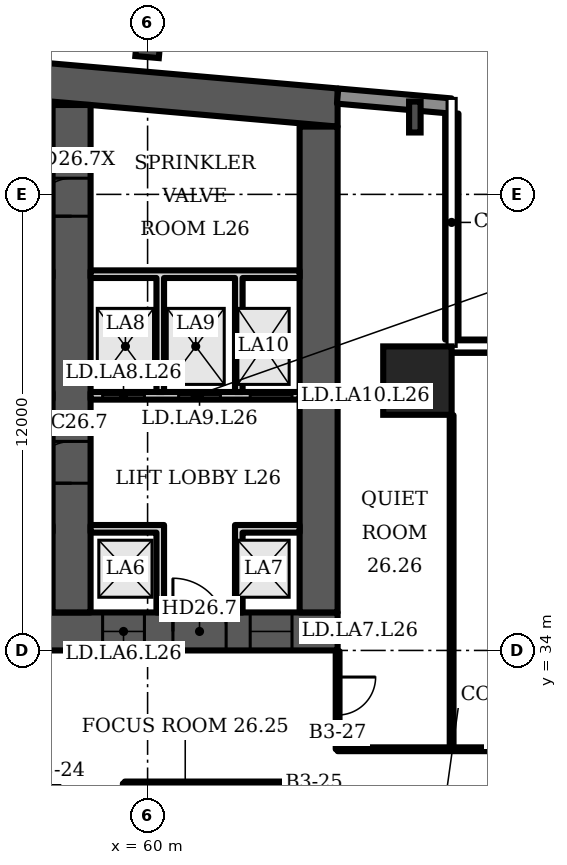
"""IFC4 building model, lengths in metres.
Left out: names, types, materials, properties, quantities, classifications, styles, units other than length and angle.
Written with IfcOpenShell. Run it as: python <this file> out.ifc"""

import sys

from ifc_helpers import new_model, si_unit, direction, frame, frame_2d, origin, origin_2d, place, context, subcontext, project, spatial, polyline, rectangle, i_section, outline, extrude, element, fill, save


model = new_model("IFC4")
c1 = context("Model", 3, precision=1e-05, world=origin(), true_north=direction((0.0, 1.0)))
c2 = subcontext(c1, "Body", "Model", "MODEL_VIEW")
j1 = project(units=[si_unit("LENGTHUNIT", "METRE"), si_unit("PLANEANGLEUNIT", "RADIAN")], contexts=[c1])
p1 = place(None, origin())
s1 = spatial("IfcSite", under=j1, at=p1, CompositionType="ELEMENT")
p2 = place(p1, origin())
s2 = spatial("IfcBuilding", under=s1, at=p2, CompositionType="ELEMENT")
p3 = place(p2, frame((0.0, 0.0, 114.7)))
s3 = spatial("IfcBuildingStorey", under=s2, at=p3, CompositionType="ELEMENT", Elevation=114.7)
p4 = place(p3, origin())
e1 = element("IfcWall", 1, at=p4, inside=s3, PredefinedType="SHEAR", context=c2, shape_type="SweptSolid", body=[
    extrude(outline(polyline([(16.0, 47.784), (40.5, 49.927), (65.0, 47.784), (65.0, 48.787), (40.5, 50.931), (16.0, 48.787), (16.0, 47.784)])), origin(), (0.0, 0.0, 1.0), 3.6),
])
p5 = place(p3, frame((16.0, 34.5, 0.0), z_axis=(0.0, 0.0, 1.0), x_axis=(1.0, 0.0, 0.0)))
e2 = element("IfcWall", 2, at=p5, inside=s3, PredefinedType="SHEAR", context=c2, shape_type="SweptSolid", body=[
    extrude(rectangle(XDim=49.0, YDim=1.0, at=frame_2d((24.5, 0.0))), origin(), (0.0, 0.0, 1.0), 3.6),
])
p6 = place(p5, frame((1.2, 0.0, 0.0)))
e3 = element("IfcOpeningElement", 3, at=p6, cuts=e2, PredefinedType="OPENING", context=c2, shape_type="SweptSolid", body=[
    extrude(rectangle(XDim=1.1, YDim=2.1, at=frame_2d((0.55, 1.05))), frame((0.0, 0.51, 0.0), z_axis=(0.0, -1.0, 0.0), x_axis=(1.0, 0.0, 0.0)), (0.0, 0.0, 1.0), 1.02),
])
p7 = place(p5, frame((5.083, 0.0, 0.0)))
e4 = element("IfcOpeningElement", 4, at=p7, cuts=e2, PredefinedType="OPENING", context=c2, shape_type="SweptSolid", body=[
    extrude(rectangle(XDim=1.1, YDim=2.1, at=frame_2d((0.55, 1.05))), frame((0.0, 0.51, 0.0), z_axis=(0.0, -1.0, 0.0), x_axis=(1.0, 0.0, 0.0)), (0.0, 0.0, 1.0), 1.02),
])
p8 = place(p5, frame((2.933, 0.0, 0.0)))
e5 = element("IfcOpeningElement", 5, at=p8, cuts=e2, PredefinedType="OPENING", context=c2, shape_type="SweptSolid", body=[
    extrude(rectangle(XDim=1.4, YDim=2.1, at=frame_2d((0.7, 1.05))), frame((0.0, 0.51, 0.0), z_axis=(0.0, -1.0, 0.0), x_axis=(1.0, 0.0, 0.0)), (0.0, 0.0, 1.0), 1.02),
])
p9 = place(p5, frame((7.65, 0.0, 0.0)))
e6 = element("IfcOpeningElement", 6, at=p9, cuts=e2, PredefinedType="OPENING", context=c2, shape_type="SweptSolid", body=[
    extrude(rectangle(XDim=1.2, YDim=2.1, at=frame_2d((0.6, 1.05))), frame((0.0, 0.51, 0.0), z_axis=(0.0, -1.0, 0.0), x_axis=(1.0, 0.0, 0.0)), (0.0, 0.0, 1.0), 1.02),
])
p10 = place(p5, frame((14.817, 0.0, 0.0)))
e7 = element("IfcOpeningElement", 7, at=p10, cuts=e2, PredefinedType="OPENING", context=c2, shape_type="SweptSolid", body=[
    extrude(rectangle(XDim=1.1, YDim=2.1, at=frame_2d((0.55, 1.05))), frame((0.0, 0.51, 0.0), z_axis=(0.0, -1.0, 0.0), x_axis=(1.0, 0.0, 0.0)), (0.0, 0.0, 1.0), 1.02),
])
p11 = place(p5, frame((19.083, 0.0, 0.0)))
e8 = element("IfcOpeningElement", 8, at=p11, cuts=e2, PredefinedType="OPENING", context=c2, shape_type="SweptSolid", body=[
    extrude(rectangle(XDim=1.1, YDim=2.1, at=frame_2d((0.55, 1.05))), frame((0.0, 0.51, 0.0), z_axis=(0.0, -1.0, 0.0), x_axis=(1.0, 0.0, 0.0)), (0.0, 0.0, 1.0), 1.02),
])
p12 = place(p5, frame((16.8, 0.0, 0.0)))
e9 = element("IfcOpeningElement", 9, at=p12, cuts=e2, PredefinedType="OPENING", context=c2, shape_type="SweptSolid", body=[
    extrude(rectangle(XDim=1.4, YDim=2.1, at=frame_2d((0.7, 1.05))), frame((0.0, 0.51, 0.0), z_axis=(0.0, -1.0, 0.0), x_axis=(1.0, 0.0, 0.0)), (0.0, 0.0, 1.0), 1.02),
])
p13 = place(p5, frame((21.817, 0.0, 0.0)))
e10 = element("IfcOpeningElement", 10, at=p13, cuts=e2, PredefinedType="OPENING", context=c2, shape_type="SweptSolid", body=[
    extrude(rectangle(XDim=1.1, YDim=2.1, at=frame_2d((0.55, 1.05))), frame((0.0, 0.51, 0.0), z_axis=(0.0, -1.0, 0.0), x_axis=(1.0, 0.0, 0.0)), (0.0, 0.0, 1.0), 1.02),
])
p14 = place(p5, frame((26.083, 0.0, 0.0)))
e11 = element("IfcOpeningElement", 11, at=p14, cuts=e2, PredefinedType="OPENING", context=c2, shape_type="SweptSolid", body=[
    extrude(rectangle(XDim=1.1, YDim=2.1, at=frame_2d((0.55, 1.05))), frame((0.0, 0.51, 0.0), z_axis=(0.0, -1.0, 0.0), x_axis=(1.0, 0.0, 0.0)), (0.0, 0.0, 1.0), 1.02),
])
p15 = place(p5, frame((33.15, 0.0, 0.0)))
e12 = element("IfcOpeningElement", 12, at=p15, cuts=e2, PredefinedType="OPENING", context=c2, shape_type="SweptSolid", body=[
    extrude(rectangle(XDim=1.2, YDim=2.1, at=frame_2d((0.6, 1.05))), frame((0.0, 0.51, 0.0), z_axis=(0.0, -1.0, 0.0), x_axis=(1.0, 0.0, 0.0)), (0.0, 0.0, 1.0), 1.02),
])
p16 = place(p5, frame((37.8, 0.0, 0.0)))
e13 = element("IfcOpeningElement", 13, at=p16, cuts=e2, PredefinedType="OPENING", context=c2, shape_type="SweptSolid", body=[
    extrude(rectangle(XDim=1.4, YDim=2.1, at=frame_2d((0.7, 1.05))), frame((0.0, 0.51, 0.0), z_axis=(0.0, -1.0, 0.0), x_axis=(1.0, 0.0, 0.0)), (0.0, 0.0, 1.0), 1.02),
])
p17 = place(p5, frame((42.817, 0.0, 0.0)))
e14 = element("IfcOpeningElement", 14, at=p17, cuts=e2, PredefinedType="OPENING", context=c2, shape_type="SweptSolid", body=[
    extrude(rectangle(XDim=1.1, YDim=2.1, at=frame_2d((0.55, 1.05))), frame((0.0, 0.51, 0.0), z_axis=(0.0, -1.0, 0.0), x_axis=(1.0, 0.0, 0.0)), (0.0, 0.0, 1.0), 1.02),
])
p18 = place(p5, frame((46.7, 0.0, 0.0)))
e15 = element("IfcOpeningElement", 15, at=p18, cuts=e2, PredefinedType="OPENING", context=c2, shape_type="SweptSolid", body=[
    extrude(rectangle(XDim=1.1, YDim=2.1, at=frame_2d((0.55, 1.05))), frame((0.0, 0.51, 0.0), z_axis=(0.0, -1.0, 0.0), x_axis=(1.0, 0.0, 0.0)), (0.0, 0.0, 1.0), 1.02),
])
p19 = place(p5, frame((44.667, 0.0, 0.0)))
e16 = element("IfcOpeningElement", 16, at=p19, cuts=e2, PredefinedType="OPENING", context=c2, shape_type="SweptSolid", body=[
    extrude(rectangle(XDim=1.4, YDim=2.1, at=frame_2d((0.7, 1.05))), frame((0.0, 0.51, 0.0), z_axis=(0.0, -1.0, 0.0), x_axis=(1.0, 0.0, 0.0)), (0.0, 0.0, 1.0), 1.02),
])
p20 = place(p3, frame((58.0, 35.0, 0.0), z_axis=(0.0, 0.0, 1.0), x_axis=(0.0, 1.0, 0.0)))
e17 = element("IfcWall", 17, at=p20, inside=s3, PredefinedType="SHEAR", context=c2, shape_type="SweptSolid", body=[
    extrude(rectangle(XDim=13.352, YDim=1.0, at=frame_2d((6.676, 0.0))), origin(), (0.0, 0.0, 1.0), 3.6),
])
p21 = place(p20, frame((10.426, 0.0, 0.0)))
e18 = element("IfcOpeningElement", 18, at=p21, cuts=e17, PredefinedType="OPENING", context=c2, shape_type="SweptSolid", body=[
    extrude(rectangle(XDim=1.0, YDim=2.1, at=frame_2d((0.5, 1.05))), frame((0.0, 0.51, 0.0), z_axis=(0.0, -1.0, 0.0), x_axis=(1.0, 0.0, 0.0)), (0.0, 0.0, 1.0), 1.02),
])
p22 = place(p20, frame((3.4, 0.0, 0.0)))
e19 = element("IfcOpeningElement", 19, at=p22, cuts=e17, PredefinedType="OPENING", context=c2, shape_type="SweptSolid", body=[
    extrude(rectangle(XDim=1.1, YDim=2.1, at=frame_2d((0.55, 1.05))), frame((0.0, 0.51, 0.0), z_axis=(0.0, -1.0, 0.0), x_axis=(1.0, 0.0, 0.0)), (0.0, 0.0, 1.0), 1.02),
])
p23 = place(p3, frame((64.5, 35.0, 0.0), z_axis=(0.0, 0.0, 1.0), x_axis=(0.0, 1.0, 0.0)))
e20 = element("IfcWall", 20, at=p23, inside=s3, PredefinedType="SHEAR", context=c2, shape_type="SweptSolid", body=[
    extrude(rectangle(XDim=12.784, YDim=1.0, at=frame_2d((6.392, 0.0))), origin(), (0.0, 0.0, 1.0), 3.6),
])
p24 = place(p3, frame((67.1, 41.1, 0.0), z_axis=(0.0, 0.0, 1.0), x_axis=(1.0, 0.0, 0.0)))
e21 = element("IfcColumn", 21, at=p24, inside=s3, PredefinedType="COLUMN", context=c2, shape_type="SweptSolid", body=[
    extrude(rectangle(XDim=1.8, YDim=1.8, at=origin_2d()), origin(), (0.0, 0.0, 1.0), 3.6),
])
p25 = place(p3, frame((67.032, 48.036, 0.0), z_axis=(0.0, 0.0, 1.0), x_axis=(1.0, 0.0, 0.0)))
e22 = element("IfcColumn", 22, at=p25, inside=s3, PredefinedType="COLUMN", context=c2, shape_type="SweptSolid", body=[
    extrude(i_section(OverallWidth=0.303, OverallDepth=0.814, WebThickness=0.021, FlangeThickness=0.04, FilletRadius=0.03, at=origin_2d()), origin(), (0.0, 0.0, 1.0), 3.6),
])
p26 = place(p3, frame((60.0, 49.765, 0.0), z_axis=(0.0, 0.0, 1.0), x_axis=(0.087156, 0.996198, 0.0)))
e23 = element("IfcColumn", 23, at=p26, inside=s3, PredefinedType="COLUMN", context=c2, shape_type="SweptSolid", body=[
    extrude(i_section(OverallWidth=0.305, OverallDepth=0.62, WebThickness=0.021, FlangeThickness=0.04, FilletRadius=0.027, at=origin_2d()), origin(), (0.0, 0.0, 1.0), 3.6),
])
p27 = place(p3, frame((67.983, 48.326, 0.0), z_axis=(0.0, 0.0, 1.0), x_axis=(-0.996194, 0.087168, 0.0)))
e24 = element("IfcWall", 24, at=p27, inside=s3, PredefinedType="SOLIDWALL", context=c2, shape_type="SweptSolid", body=[
    extrude(rectangle(XDim=2.994, YDim=0.4, at=frame_2d((1.497, 0.0))), origin(), (0.0, 0.0, 1.0), 3.2),
])
p28 = place(p3, frame((76.155, 42.005, 0.0), z_axis=(0.0, 0.0, 1.0), x_axis=(-1.0, 0.0, 0.0)))
e25 = element("IfcWall", 25, at=p28, inside=s3, PredefinedType="SOLIDWALL", context=c2, shape_type="SweptSolid", body=[
    extrude(rectangle(XDim=8.155, YDim=0.35, at=frame_2d((4.078, 0.0))), origin(), (0.0, 0.0, 1.0), 1.0),
])
p29 = place(p3, frame((68.005, 42.18, 0.0), z_axis=(0.0, 0.0, 1.0), x_axis=(0.0, 1.0, 0.0)))
e26 = element("IfcWall", 26, at=p29, inside=s3, PredefinedType="SOLIDWALL", context=c2, shape_type="SweptSolid", body=[
    extrude(rectangle(XDim=5.947, YDim=0.35, at=frame_2d((2.973, 0.0))), origin(), (0.0, 0.0, 1.0), 1.0),
])
p30 = place(p3, frame((58.5, 40.7, 0.0), z_axis=(0.0, 0.0, 1.0), x_axis=(1.0, 0.0, 0.0)))
e27 = element("IfcWall", 27, at=p30, inside=s3, PredefinedType="PARTITIONING", context=c2, shape_type="SweptSolid", body=[
    extrude(rectangle(XDim=5.5, YDim=0.2, at=frame_2d((2.75, 0.0))), origin(), (0.0, 0.0, 1.0), 3.2),
])
p31 = place(p30, frame((0.317, 0.0, 0.0)))
e28 = element("IfcOpeningElement", 28, at=p31, cuts=e27, PredefinedType="OPENING", context=c2, shape_type="SweptSolid", body=[
    extrude(rectangle(XDim=1.1, YDim=2.1, at=frame_2d((0.55, 1.05))), frame((0.0, 0.11, 0.0), z_axis=(0.0, -1.0, 0.0), x_axis=(1.0, 0.0, 0.0)), (0.0, 0.0, 1.0), 0.22),
])
p32 = place(p30, frame((2.317, 0.0, 0.0)))
e29 = element("IfcOpeningElement", 29, at=p32, cuts=e27, PredefinedType="OPENING", context=c2, shape_type="SweptSolid", body=[
    extrude(rectangle(XDim=1.1, YDim=2.1, at=frame_2d((0.55, 1.05))), frame((0.0, 0.11, 0.0), z_axis=(0.0, -1.0, 0.0), x_axis=(1.0, 0.0, 0.0)), (0.0, 0.0, 1.0), 0.22),
])
p33 = place(p30, frame((4.2, 0.0, 0.0)))
e30 = element("IfcOpeningElement", 30, at=p33, cuts=e27, PredefinedType="OPENING", context=c2, shape_type="SweptSolid", body=[
    extrude(rectangle(XDim=1.1, YDim=2.1, at=frame_2d((0.55, 1.05))), frame((0.0, 0.11, 0.0), z_axis=(0.0, -1.0, 0.0), x_axis=(1.0, 0.0, 0.0)), (0.0, 0.0, 1.0), 0.22),
])
p34 = place(p3, frame((0.0, 0.0, -0.0)))
e31 = element("IfcWall", 31, at=p34, inside=s3, PredefinedType="PARTITIONING", context=c2, shape_type="SweptSolid", body=[
    extrude(outline(polyline([(60.233, 37.1), (58.5, 37.1), (58.5, 37.3), (60.233, 37.3), (60.433, 37.3), (60.433, 35.0), (60.233, 35.0), (60.233, 37.1)])), origin(), (0.0, 0.0, 1.0), 3.2),
])
p35 = place(p3, frame((0.0, 0.0, -0.0)))
e32 = element("IfcWall", 32, at=p35, inside=s3, PredefinedType="PARTITIONING", context=c2, shape_type="SweptSolid", body=[
    extrude(outline(polyline([(62.3, 37.3), (62.5, 37.3), (64.0, 37.3), (64.0, 37.1), (62.5, 37.1), (62.5, 35.0), (62.3, 35.0), (62.3, 37.3)])), origin(), (0.0, 0.0, 1.0), 3.2),
])
p36 = place(p3, frame((0.0, 0.0, -0.0)))
e33 = element("IfcWall", 33, at=p36, inside=s3, PredefinedType="PARTITIONING", context=c2, shape_type="SweptSolid", body=[
    extrude(outline(polyline([(60.433, 40.8), (60.233, 40.8), (60.233, 43.8), (58.5, 43.8), (58.5, 44.0), (64.0, 44.0), (64.0, 43.8), (62.5, 43.8), (62.5, 40.8), (62.3, 40.8), (62.3, 43.8), (60.433, 43.8), (60.433, 40.8)])), origin(), (0.0, 0.0, 1.0), 3.2),
])
p37 = place(p3, frame((57.6, -0.79, 0.0), z_axis=(0.0, 0.0, 1.0), x_axis=(0.0, 1.0, 0.0)))
e34 = element("IfcWall", 34, at=p37, inside=s3, PredefinedType="PARTITIONING", context=c2, shape_type="SweptSolid", body=[
    extrude(rectangle(XDim=31.29, YDim=0.1, at=frame_2d((15.645, 0.0))), origin(), (0.0, 0.0, 1.0), 2.58),
])
p38 = place(p37, frame((7.5, 0.0, 0.0)))
e35 = element("IfcOpeningElement", 35, at=p38, cuts=e34, PredefinedType="OPENING", context=c2, shape_type="SweptSolid", body=[
    extrude(rectangle(XDim=1.0, YDim=2.1, at=frame_2d((0.5, 1.05))), frame((0.0, 0.06, 0.0), z_axis=(0.0, -1.0, 0.0), x_axis=(1.0, 0.0, 0.0)), (0.0, 0.0, 1.0), 0.12),
])
p39 = place(p37, frame((17.344, 0.0, 0.0)))
e36 = element("IfcOpeningElement", 36, at=p39, cuts=e34, PredefinedType="OPENING", context=c2, shape_type="SweptSolid", body=[
    extrude(rectangle(XDim=1.0, YDim=2.1, at=frame_2d((0.5, 1.05))), frame((0.0, 0.06, 0.0), z_axis=(0.0, -1.0, 0.0), x_axis=(1.0, 0.0, 0.0)), (0.0, 0.0, 1.0), 0.12),
])
p40 = place(p37, frame((21.185, 0.0, 0.0)))
e37 = element("IfcOpeningElement", 37, at=p40, cuts=e34, PredefinedType="OPENING", context=c2, shape_type="SweptSolid", body=[
    extrude(rectangle(XDim=1.0, YDim=2.1, at=frame_2d((0.5, 1.05))), frame((0.0, 0.06, 0.0), z_axis=(0.0, -1.0, 0.0), x_axis=(1.0, 0.0, 0.0)), (0.0, 0.0, 1.0), 0.12),
])
p41 = place(p37, frame((25.03, 0.0, 0.0)))
e38 = element("IfcOpeningElement", 38, at=p41, cuts=e34, PredefinedType="OPENING", context=c2, shape_type="SweptSolid", body=[
    extrude(rectangle(XDim=1.0, YDim=2.1, at=frame_2d((0.5, 1.05))), frame((0.0, 0.06, 0.0), z_axis=(0.0, -1.0, 0.0), x_axis=(1.0, 0.0, 0.0)), (0.0, 0.0, 1.0), 0.12),
])
p42 = place(p37, frame((30.139, 0.0, 0.0)))
e39 = element("IfcOpeningElement", 39, at=p42, cuts=e34, PredefinedType="OPENING", context=c2, shape_type="SweptSolid", body=[
    extrude(rectangle(XDim=1.0, YDim=2.1, at=frame_2d((0.5, 1.05))), frame((0.0, 0.06, 0.0), z_axis=(0.0, -1.0, 0.0), x_axis=(1.0, 0.0, 0.0)), (0.0, 0.0, 1.0), 0.12),
])
p43 = place(p3, frame((59.4, 13.7, 0.0), z_axis=(0.0, 0.0, 1.0), x_axis=(0.0, 1.0, 0.0)))
e40 = element("IfcWall", 40, at=p43, inside=s3, PredefinedType="PARTITIONING", context=c2, shape_type="SweptSolid", body=[
    extrude(rectangle(XDim=16.8, YDim=0.1, at=frame_2d((8.4, 0.0))), origin(), (0.0, 0.0, 1.0), 3.2),
])
p44 = place(p43, frame((2.45, 0.0, 0.0)))
e41 = element("IfcOpeningElement", 41, at=p44, cuts=e40, PredefinedType="OPENING", context=c2, shape_type="SweptSolid", body=[
    extrude(rectangle(XDim=1.0, YDim=2.1, at=frame_2d((0.5, 1.05))), frame((0.0, 0.06, 0.0), z_axis=(0.0, -1.0, 0.0), x_axis=(1.0, 0.0, 0.0)), (0.0, 0.0, 1.0), 0.12),
])
p45 = place(p43, frame((7.125, 0.0, 0.0)))
e42 = element("IfcOpeningElement", 42, at=p45, cuts=e40, PredefinedType="OPENING", context=c2, shape_type="SweptSolid", body=[
    extrude(rectangle(XDim=1.0, YDim=2.1, at=frame_2d((0.5, 1.05))), frame((0.0, 0.06, 0.0), z_axis=(0.0, -1.0, 0.0), x_axis=(1.0, 0.0, 0.0)), (0.0, 0.0, 1.0), 0.12),
])
p46 = place(p43, frame((11.675, 0.0, 0.0)))
e43 = element("IfcOpeningElement", 43, at=p46, cuts=e40, PredefinedType="OPENING", context=c2, shape_type="SweptSolid", body=[
    extrude(rectangle(XDim=1.0, YDim=2.1, at=frame_2d((0.5, 1.05))), frame((0.0, 0.06, 0.0), z_axis=(0.0, -1.0, 0.0), x_axis=(1.0, 0.0, 0.0)), (0.0, 0.0, 1.0), 0.12),
])
p47 = place(p3, frame((59.4, 30.5, 0.0), z_axis=(0.0, 0.0, 1.0), x_axis=(1.0, 0.0, 0.0)))
e44 = element("IfcWall", 44, at=p47, inside=s3, PredefinedType="PARTITIONING", context=c2, shape_type="SweptSolid", body=[
    extrude(rectangle(XDim=4.175, YDim=0.1, at=frame_2d((2.087, 0.0))), origin(), (0.0, 0.0, 1.0), 3.2),
])
p48 = place(p47, frame((3.025, 0.0, 0.0)))
e45 = element("IfcOpeningElement", 45, at=p48, cuts=e44, PredefinedType="OPENING", context=c2, shape_type="SweptSolid", body=[
    extrude(rectangle(XDim=1.0, YDim=2.1, at=frame_2d((0.5, 1.05))), frame((0.0, 0.06, 0.0), z_axis=(0.0, -1.0, 0.0), x_axis=(1.0, 0.0, 0.0)), (0.0, 0.0, 1.0), 0.12),
])
p49 = place(p3, frame((63.575, 29.075, 0.0), z_axis=(0.0, 0.0, 1.0), x_axis=(0.0, 1.0, 0.0)))
e46 = element("IfcWall", 46, at=p49, inside=s3, PredefinedType="PARTITIONING", context=c2, shape_type="SweptSolid", body=[
    extrude(rectangle(XDim=1.425, YDim=0.1, at=frame_2d((0.712, 0.0))), origin(), (0.0, 0.0, 1.0), 3.2),
])
p50 = place(p3, frame((65.0, 31.4, 0.0), z_axis=(0.0, 0.0, 1.0), x_axis=(0.0, 1.0, 0.0)))
e47 = element("IfcWall", 47, at=p50, inside=s3, PredefinedType="PARTITIONING", context=c2, shape_type="SweptSolid", body=[
    extrude(rectangle(XDim=2.58, YDim=0.1, at=frame_2d((1.29, 0.0))), origin(), (0.0, 0.0, 1.0), 3.2),
])
p51 = place(p50, frame((0.9, 0.0, 0.0)))
e48 = element("IfcOpeningElement", 48, at=p51, cuts=e47, PredefinedType="OPENING", context=c2, shape_type="SweptSolid", body=[
    extrude(rectangle(XDim=1.0, YDim=2.1, at=frame_2d((0.5, 1.05))), frame((0.0, 0.06, 0.0), z_axis=(0.0, -1.0, 0.0), x_axis=(1.0, 0.0, 0.0)), (0.0, 0.0, 1.0), 0.12),
])
p52 = place(p3, frame((65.0, 31.4, 0.0), z_axis=(0.0, 0.0, 1.0), x_axis=(1.0, 0.0, 0.0)))
e49 = element("IfcWall", 49, at=p52, inside=s3, PredefinedType="PARTITIONING", context=c2, shape_type="SweptSolid", body=[
    extrude(rectangle(XDim=4.69, YDim=0.1, at=frame_2d((2.345, 0.0))), origin(), (0.0, 0.0, 1.0), 3.2),
])
p53 = place(p3, frame((68.0, 31.4, 0.0), z_axis=(0.0, 0.0, 1.0), x_axis=(0.0, 1.0, 0.0)))
e50 = element("IfcWall", 50, at=p53, inside=s3, PredefinedType="PARTITIONING", context=c2, shape_type="SweptSolid", body=[
    extrude(rectangle(XDim=8.79, YDim=0.1, at=frame_2d((4.395, 0.0))), origin(), (0.0, 0.0, 1.0), 3.2),
])
p54 = place(p3, frame((44.15, 30.5, 0.0), z_axis=(0.0, 0.0, 1.0), x_axis=(1.0, 0.0, 0.0)))
e51 = element("IfcWall", 51, at=p54, inside=s3, PredefinedType="PARTITIONING", context=c2, shape_type="SweptSolid", body=[
    extrude(rectangle(XDim=13.45, YDim=0.1, at=frame_2d((6.725, 0.0))), origin(), (0.0, 0.0, 1.0), 3.2),
])
p55 = place(p17, origin())
e52 = element("IfcDoor", 52, at=p55, inside=s3, OperationType="DOUBLE_DOOR_SLIDING", PredefinedType="DOOR", context=c2, shape_type="SweptSolid", body=[
    extrude(rectangle(XDim=1.1, YDim=2.1, at=frame_2d((0.55, 1.05))), frame((0.0, 0.025, 0.0), z_axis=(0.0, -1.0, 0.0), x_axis=(1.0, 0.0, 0.0)), (0.0, 0.0, 1.0), 0.05),
])
fill(e14, e52)
p56 = place(p18, origin())
e53 = element("IfcDoor", 53, at=p56, inside=s3, OperationType="DOUBLE_DOOR_SLIDING", PredefinedType="DOOR", context=c2, shape_type="SweptSolid", body=[
    extrude(rectangle(XDim=1.1, YDim=2.1, at=frame_2d((0.55, 1.05))), frame((0.0, 0.025, 0.0), z_axis=(0.0, -1.0, 0.0), x_axis=(1.0, 0.0, 0.0)), (0.0, 0.0, 1.0), 0.05),
])
fill(e15, e53)
p57 = place(p19, origin())
e54 = element("IfcDoor", 54, at=p57, inside=s3, OperationType="DOUBLE_DOOR_SINGLE_SWING", PredefinedType="DOOR", context=c2, shape_type="SweptSolid", body=[
    extrude(rectangle(XDim=1.4, YDim=2.1, at=frame_2d((0.7, 1.05))), frame((0.0, 0.025, 0.0), z_axis=(0.0, -1.0, 0.0), x_axis=(1.0, 0.0, 0.0)), (0.0, 0.0, 1.0), 0.05),
])
fill(e16, e54)
p58 = place(p31, origin())
e55 = element("IfcDoor", 55, at=p58, inside=s3, OperationType="DOUBLE_DOOR_SLIDING", PredefinedType="DOOR", context=c2, shape_type="SweptSolid", body=[
    extrude(rectangle(XDim=1.1, YDim=2.1, at=frame_2d((0.55, 1.05))), frame((0.0, 0.025, 0.0), z_axis=(0.0, -1.0, 0.0), x_axis=(1.0, 0.0, 0.0)), (0.0, 0.0, 1.0), 0.05),
])
fill(e28, e55)
p59 = place(p32, origin())
e56 = element("IfcDoor", 56, at=p59, inside=s3, OperationType="DOUBLE_DOOR_SLIDING", PredefinedType="DOOR", context=c2, shape_type="SweptSolid", body=[
    extrude(rectangle(XDim=1.1, YDim=2.1, at=frame_2d((0.55, 1.05))), frame((0.0, 0.025, 0.0), z_axis=(0.0, -1.0, 0.0), x_axis=(1.0, 0.0, 0.0)), (0.0, 0.0, 1.0), 0.05),
])
fill(e29, e56)
p60 = place(p33, origin())
e57 = element("IfcDoor", 57, at=p60, inside=s3, OperationType="DOUBLE_DOOR_SLIDING", PredefinedType="DOOR", context=c2, shape_type="SweptSolid", body=[
    extrude(rectangle(XDim=1.1, YDim=2.1, at=frame_2d((0.55, 1.05))), frame((0.0, 0.025, 0.0), z_axis=(0.0, -1.0, 0.0), x_axis=(1.0, 0.0, 0.0)), (0.0, 0.0, 1.0), 0.05),
])
fill(e30, e57)
p61 = place(p21, origin())
e58 = element("IfcDoor", 58, at=p61, inside=s3, OperationType="SINGLE_SWING_LEFT", PredefinedType="DOOR", context=c2, shape_type="SweptSolid", body=[
    extrude(rectangle(XDim=1.0, YDim=2.1, at=frame_2d((0.5, 1.05))), frame((0.0, 0.5, 0.0), z_axis=(0.0, -1.0, 0.0), x_axis=(1.0, 0.0, 0.0)), (0.0, 0.0, 1.0), 1.0),
])
fill(e18, e58)
p62 = place(p22, origin())
e59 = element("IfcDoor", 59, at=p62, inside=s3, OperationType="SINGLE_SWING_LEFT", PredefinedType="DOOR", context=c2, shape_type="SweptSolid", body=[
    extrude(rectangle(XDim=1.1, YDim=2.1, at=frame_2d((0.55, 1.05))), frame((0.0, 0.025, 0.0), z_axis=(0.0, -1.0, 0.0), x_axis=(1.0, 0.0, 0.0)), (0.0, 0.0, 1.0), 0.05),
])
fill(e19, e59)
p63 = place(p48, origin())
e60 = element("IfcDoor", 60, at=p63, inside=s3, OperationType="SINGLE_SWING_RIGHT", PredefinedType="DOOR", context=c2, shape_type="SweptSolid", body=[
    extrude(rectangle(XDim=1.0, YDim=2.1, at=frame_2d((0.5, 1.05))), frame((0.0, 0.025, 0.0), z_axis=(0.0, -1.0, 0.0), x_axis=(1.0, 0.0, 0.0)), (0.0, 0.0, 1.0), 0.05),
])
fill(e45, e60)
p64 = place(p51, origin())
e61 = element("IfcDoor", 61, at=p64, inside=s3, OperationType="SINGLE_SWING_RIGHT", PredefinedType="DOOR", context=c2, shape_type="SweptSolid", body=[
    extrude(rectangle(XDim=1.0, YDim=2.1, at=frame_2d((0.5, 1.05))), frame((0.0, 0.025, 0.0), z_axis=(0.0, -1.0, 0.0), x_axis=(1.0, 0.0, 0.0)), (0.0, 0.0, 1.0), 0.05),
])
fill(e48, e61)
save(model, sys.argv[1])
